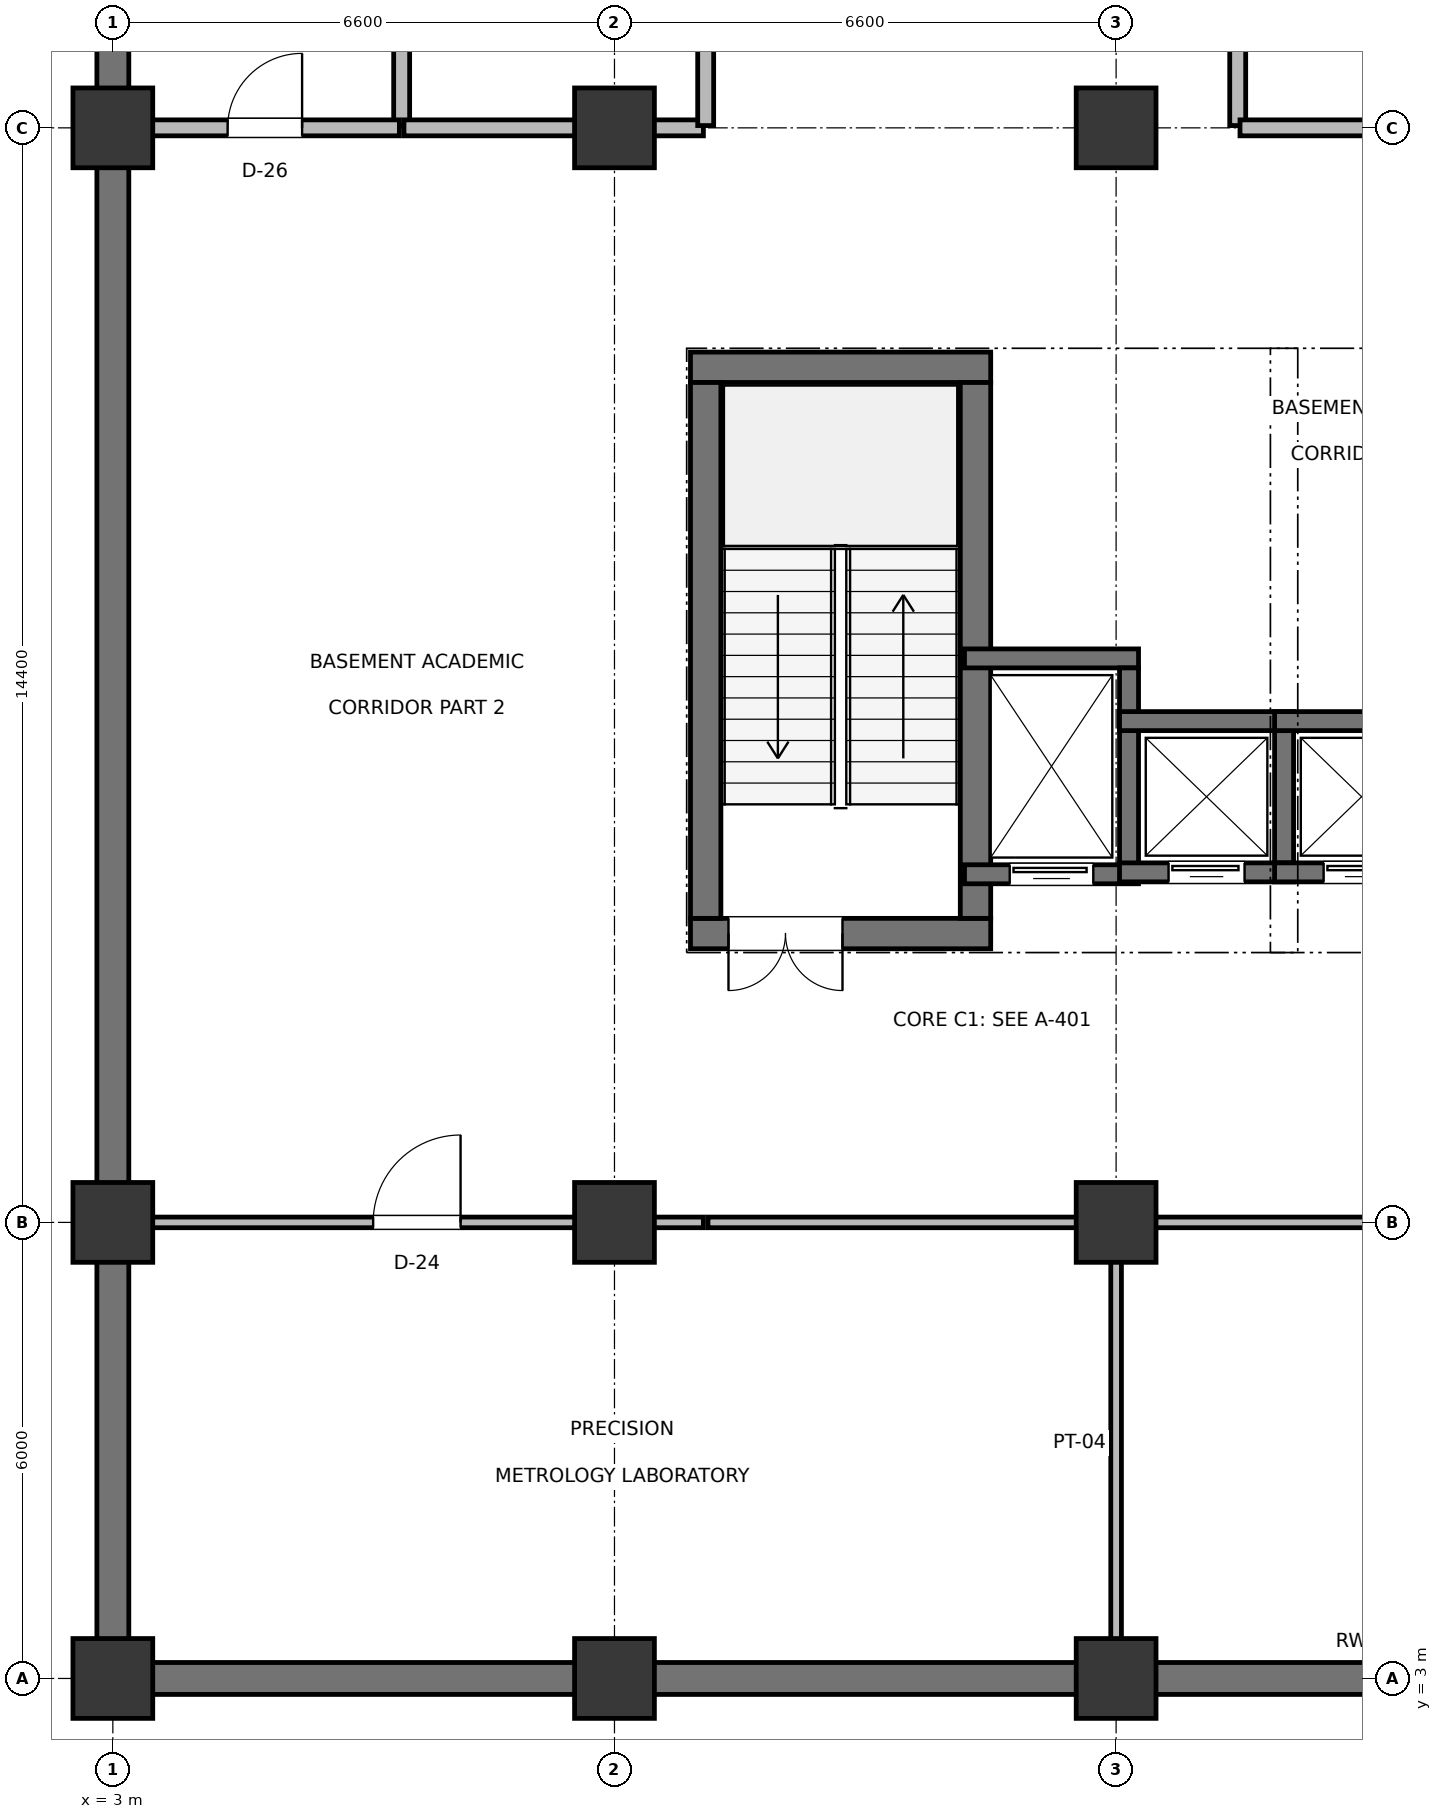
"""IFC4 building model, lengths in metres.
Left out: names, types, materials, properties, quantities, classifications, styles, units other than length and angle.
Written with IfcOpenShell. Run it as: python <this file> out.ifc"""

import sys

from ifc_helpers import new_model, si_unit, direction, frame, frame_2d, origin, origin_2d, place, context, subcontext, project, spatial, rectangle, extrude, element, fill, save


model = new_model("IFC4")
c1 = context("Model", 3, precision=1e-05, world=origin(), true_north=direction((0.0, 1.0)))
c2 = subcontext(c1, "Body", "Model", "MODEL_VIEW")
j1 = project(units=[si_unit("LENGTHUNIT", "METRE"), si_unit("PLANEANGLEUNIT", "RADIAN")], contexts=[c1])
p1 = place(None, origin())
s1 = spatial("IfcSite", under=j1, at=p1, CompositionType="ELEMENT")
p2 = place(p1, origin())
s2 = spatial("IfcBuilding", under=s1, at=p2, CompositionType="ELEMENT")
p3 = place(p2, frame((0.0, 0.0, -4.5)))
s3 = spatial("IfcBuildingStorey", under=s2, at=p3, CompositionType="ELEMENT", Elevation=-4.5)
for number, where, z_axis, x_axis in (
    (1, (3.0, 3.0, 0.0), (0.0, 0.0, 1.0), (1.0, 0.0, 0.0)),
    (2, (3.0, 9.0, 0.0), (0.0, 0.0, 1.0), (1.0, 0.0, 0.0)),
    (3, (3.0, 23.4, 0.0), (0.0, 0.0, 1.0), (1.0, 0.0, 0.0)),
    (4, (9.6, 3.0, 0.0), (0.0, 0.0, 1.0), (1.0, 0.0, 0.0)),
    (5, (9.6, 9.0, 0.0), (0.0, 0.0, 1.0), (1.0, 0.0, 0.0)),
    (6, (9.6, 23.4, 0.0), (0.0, 0.0, 1.0), (1.0, 0.0, 0.0)),
    (7, (16.2, 3.0, 0.0), (0.0, 0.0, 1.0), (1.0, 0.0, 0.0)),
    (8, (16.2, 9.0, 0.0), (0.0, 0.0, 1.0), (1.0, 0.0, 0.0)),
    (9, (16.2, 23.4, 0.0), (0.0, 0.0, 1.0), (1.0, 0.0, 0.0)),
):
    element("IfcColumn", number, at=place(p3, frame(where, z_axis=z_axis, x_axis=x_axis)), inside=s3, PredefinedType="COLUMN", context=c2, shape_type="SweptSolid", body=[
        extrude(rectangle(XDim=1.05, YDim=1.05, at=origin_2d()), origin(), (0.0, 0.0, 1.0), 4.5),
    ])
p4 = place(p3, frame((2.995, 3.0, 0.0), z_axis=(0.0, 0.0, 1.0), x_axis=(1.0, 0.0, 0.0)))
e10 = element("IfcWall", 10, at=p4, inside=s3, PredefinedType="STANDARD", context=c2, shape_type="SweptSolid", body=[
    extrude(rectangle(XDim=33.01, YDim=0.42, at=frame_2d((16.505, 0.0))), origin(), (0.0, 0.0, 1.0), 3.45),
])
p5 = place(p3, frame((3.0, 2.995, 0.0), z_axis=(0.0, 0.0, 1.0), x_axis=(0.0, 1.0, 0.0)))
e11 = element("IfcWall", 11, at=p5, inside=s3, PredefinedType="STANDARD", context=c2, shape_type="SweptSolid", body=[
    extrude(rectangle(XDim=114.01, YDim=0.42, at=frame_2d((57.005, 0.0))), origin(), (0.0, 0.0, 1.0), 3.45),
])
p6 = place(p3, frame((10.6, 12.8, 0.0), z_axis=(0.0, 0.0, 1.0), x_axis=(1.0, 0.0, 0.0)))
e12 = element("IfcWall", 12, at=p6, inside=s3, PredefinedType="SHEAR", context=c2, shape_type="SweptSolid", body=[
    extrude(rectangle(XDim=3.95, YDim=0.4, at=frame_2d((1.975, 0.0))), origin(), (0.0, 0.0, 1.0), 4.28),
])
p7 = place(p6, frame((0.5, 0.0, 0.0)))
e13 = element("IfcOpeningElement", 13, at=p7, cuts=e12, PredefinedType="OPENING", context=c2, shape_type="SweptSolid", body=[
    extrude(rectangle(XDim=1.5, YDim=2.2, at=frame_2d((0.75, 1.1))), frame((0.0, 0.21, 0.0), z_axis=(0.0, -1.0, 0.0), x_axis=(1.0, 0.0, 0.0)), (0.0, 0.0, 1.0), 0.42),
])
p8 = place(p3, frame((10.6, 20.25, 0.0), z_axis=(0.0, 0.0, 1.0), x_axis=(1.0, 0.0, 0.0)))
e14 = element("IfcWall", 14, at=p8, inside=s3, PredefinedType="SHEAR", context=c2, shape_type="SweptSolid", body=[
    extrude(rectangle(XDim=3.95, YDim=0.4, at=frame_2d((1.975, 0.0))), origin(), (0.0, 0.0, 1.0), 4.28),
])
for number, where, z_axis, x_axis in (
    (15, (10.8, 13.0, 0.0), (0.0, 0.0, 1.0), (0.0, 1.0, 0.0)),
    (16, (14.35, 13.0, 0.0), (0.0, 0.0, 1.0), (0.0, 1.0, 0.0)),
):
    element("IfcWall", number, at=place(p3, frame(where, z_axis=z_axis, x_axis=x_axis)), inside=s3, PredefinedType="SHEAR", context=c2, shape_type="SweptSolid", body=[
        extrude(rectangle(XDim=7.05, YDim=0.4, at=frame_2d((3.525, 0.0))), origin(), (0.0, 0.0, 1.0), 4.28),
    ])
p9 = place(p3, frame((14.205, 13.58, 0.0), z_axis=(0.0, 0.0, 1.0), x_axis=(1.0, 0.0, 0.0)))
e17 = element("IfcWall", 17, at=p9, inside=s3, PredefinedType="SHEAR", context=c2, shape_type="SweptSolid", body=[
    extrude(rectangle(XDim=2.29, YDim=0.25, at=frame_2d((1.145, 0.0))), origin(), (0.0, 0.0, 1.0), 4.26),
])
p10 = place(p9, frame((0.595, 0.0, 0.0)))
e18 = element("IfcOpeningElement", 18, at=p10, cuts=e17, PredefinedType="OPENING", context=c2, shape_type="SweptSolid", body=[
    extrude(rectangle(XDim=1.1, YDim=2.2, at=frame_2d((0.55, 1.1))), frame((0.0, 0.135, 0.0), z_axis=(0.0, -1.0, 0.0), x_axis=(1.0, 0.0, 0.0)), (0.0, 0.0, 1.0), 0.27),
])
p11 = place(p3, frame((14.205, 16.42, 0.0), z_axis=(0.0, 0.0, 1.0), x_axis=(1.0, 0.0, 0.0)))
e19 = element("IfcWall", 19, at=p11, inside=s3, PredefinedType="SHEAR", context=c2, shape_type="SweptSolid", body=[
    extrude(rectangle(XDim=2.29, YDim=0.25, at=frame_2d((1.145, 0.0))), origin(), (0.0, 0.0, 1.0), 4.26),
])
p12 = place(p3, frame((16.37, 13.705, 0.0), z_axis=(0.0, 0.0, 1.0), x_axis=(0.0, 1.0, 0.0)))
e20 = element("IfcWall", 20, at=p12, inside=s3, PredefinedType="SHEAR", context=c2, shape_type="SweptSolid", body=[
    extrude(rectangle(XDim=2.59, YDim=0.25, at=frame_2d((1.295, 0.0))), origin(), (0.0, 0.0, 1.0), 4.26),
])
p13 = place(p3, frame((16.245, 13.605, 0.0), z_axis=(0.0, 0.0, 1.0), x_axis=(1.0, 0.0, 0.0)))
e21 = element("IfcWall", 21, at=p13, inside=s3, PredefinedType="SHEAR", context=c2, shape_type="SweptSolid", body=[
    extrude(rectangle(XDim=2.29, YDim=0.25, at=frame_2d((1.145, 0.0))), origin(), (0.0, 0.0, 1.0), 4.26),
])
p14 = place(p13, frame((0.645, 0.0, 0.0)))
e22 = element("IfcOpeningElement", 22, at=p14, cuts=e21, PredefinedType="OPENING", context=c2, shape_type="SweptSolid", body=[
    extrude(rectangle(XDim=1.0, YDim=2.15, at=frame_2d((0.5, 1.075))), frame((0.0, 0.135, 0.0), z_axis=(0.0, -1.0, 0.0), x_axis=(1.0, 0.0, 0.0)), (0.0, 0.0, 1.0), 0.27),
])
p15 = place(p3, frame((16.245, 15.595, 0.0), z_axis=(0.0, 0.0, 1.0), x_axis=(1.0, 0.0, 0.0)))
e23 = element("IfcWall", 23, at=p15, inside=s3, PredefinedType="SHEAR", context=c2, shape_type="SweptSolid", body=[
    extrude(rectangle(XDim=2.29, YDim=0.25, at=frame_2d((1.145, 0.0))), origin(), (0.0, 0.0, 1.0), 4.26),
])
p16 = place(p3, frame((18.41, 13.73, 0.0), z_axis=(0.0, 0.0, 1.0), x_axis=(0.0, 1.0, 0.0)))
e24 = element("IfcWall", 24, at=p16, inside=s3, PredefinedType="SHEAR", context=c2, shape_type="SweptSolid", body=[
    extrude(rectangle(XDim=1.74, YDim=0.25, at=frame_2d((0.87, 0.0))), origin(), (0.0, 0.0, 1.0), 4.26),
])
p17 = place(p3, frame((18.285, 13.605, 0.0), z_axis=(0.0, 0.0, 1.0), x_axis=(1.0, 0.0, 0.0)))
e25 = element("IfcWall", 25, at=p17, inside=s3, PredefinedType="SHEAR", context=c2, shape_type="SweptSolid", body=[
    extrude(rectangle(XDim=2.29, YDim=0.25, at=frame_2d((1.145, 0.0))), origin(), (0.0, 0.0, 1.0), 4.26),
])
p18 = place(p17, frame((0.645, 0.0, 0.0)))
e26 = element("IfcOpeningElement", 26, at=p18, cuts=e25, PredefinedType="OPENING", context=c2, shape_type="SweptSolid", body=[
    extrude(rectangle(XDim=1.0, YDim=2.15, at=frame_2d((0.5, 1.075))), frame((0.0, 0.135, 0.0), z_axis=(0.0, -1.0, 0.0), x_axis=(1.0, 0.0, 0.0)), (0.0, 0.0, 1.0), 0.27),
])
p19 = place(p3, frame((18.285, 15.595, 0.0), z_axis=(0.0, 0.0, 1.0), x_axis=(1.0, 0.0, 0.0)))
e27 = element("IfcWall", 27, at=p19, inside=s3, PredefinedType="SHEAR", context=c2, shape_type="SweptSolid", body=[
    extrude(rectangle(XDim=2.29, YDim=0.25, at=frame_2d((1.145, 0.0))), origin(), (0.0, 0.0, 1.0), 4.26),
])
p20 = place(p3, frame((16.2, 3.23, 0.0), z_axis=(0.0, 0.0, 1.0), x_axis=(0.0, 1.0, 0.0)))
e28 = element("IfcWall", 28, at=p20, inside=s3, PredefinedType="PARTITIONING", context=c2, shape_type="SweptSolid", body=[
    extrude(rectangle(XDim=5.74, YDim=0.14, at=frame_2d((2.87, 0.0))), origin(), (0.0, 0.0, 1.0), 3.625),
])
p21 = place(p3, frame((3.23, 9.0, 0.0), z_axis=(0.0, 0.0, 1.0), x_axis=(1.0, 0.0, 0.0)))
e29 = element("IfcWall", 29, at=p21, inside=s3, PredefinedType="PARTITIONING", context=c2, shape_type="SweptSolid", body=[
    extrude(rectangle(XDim=7.54, YDim=0.14, at=frame_2d((3.77, 0.0))), origin(), (0.0, 0.0, 1.0), 3.525),
])
p22 = place(p21, frame((3.195, 0.0, 0.0)))
e30 = element("IfcOpeningElement", 30, at=p22, cuts=e29, PredefinedType="OPENING", context=c2, shape_type="SweptSolid", body=[
    extrude(rectangle(XDim=1.15, YDim=2.15, at=frame_2d((0.575, 1.075))), frame((0.0, 0.08, 0.0), z_axis=(0.0, -1.0, 0.0), x_axis=(1.0, 0.0, 0.0)), (0.0, 0.0, 1.0), 0.16),
])
p23 = place(p3, frame((10.83, 9.0, 0.0), z_axis=(0.0, 0.0, 1.0), x_axis=(1.0, 0.0, 0.0)))
e31 = element("IfcWall", 31, at=p23, inside=s3, PredefinedType="PARTITIONING", context=c2, shape_type="SweptSolid", body=[
    extrude(rectangle(XDim=5.34, YDim=0.14, at=frame_2d((2.67, 0.0))), origin(), (0.0, 0.0, 1.0), 3.525),
])
p24 = place(p3, frame((16.23, 9.0, 0.0), z_axis=(0.0, 0.0, 1.0), x_axis=(1.0, 0.0, 0.0)))
e32 = element("IfcWall", 32, at=p24, inside=s3, PredefinedType="PARTITIONING", context=c2, shape_type="SweptSolid", body=[
    extrude(rectangle(XDim=7.74, YDim=0.14, at=frame_2d((3.87, 0.0))), origin(), (0.0, 0.0, 1.0), 3.495),
])
p25 = place(p24, frame((3.295, 0.0, 0.0)))
e33 = element("IfcOpeningElement", 33, at=p25, cuts=e32, PredefinedType="OPENING", context=c2, shape_type="SweptSolid", body=[
    extrude(rectangle(XDim=1.15, YDim=2.15, at=frame_2d((0.575, 1.075))), frame((0.0, 0.08, 0.0), z_axis=(0.0, -1.0, 0.0), x_axis=(1.0, 0.0, 0.0)), (0.0, 0.0, 1.0), 0.16),
])
p26 = place(p3, frame((6.8, 23.43, 0.0), z_axis=(0.0, 0.0, 1.0), x_axis=(0.0, 1.0, 0.0)))
e34 = element("IfcWall", 34, at=p26, inside=s3, PredefinedType="PLUMBINGWALL", context=c2, shape_type="SweptSolid", body=[
    extrude(rectangle(XDim=6.54, YDim=0.21, at=frame_2d((3.27, 0.0))), origin(), (0.0, 0.0, 1.0), 3.425),
])
p27 = place(p3, frame((3.23, 23.4, 0.0), z_axis=(0.0, 0.0, 1.0), x_axis=(1.0, 0.0, 0.0)))
e35 = element("IfcWall", 35, at=p27, inside=s3, PredefinedType="PLUMBINGWALL", context=c2, shape_type="SweptSolid", body=[
    extrude(rectangle(XDim=3.54, YDim=0.21, at=frame_2d((1.77, 0.0))), origin(), (0.0, 0.0, 1.0), 3.755),
])
p28 = place(p27, frame((1.28, 0.0, 0.0)))
e36 = element("IfcOpeningElement", 36, at=p28, cuts=e35, PredefinedType="OPENING", context=c2, shape_type="SweptSolid", body=[
    extrude(rectangle(XDim=0.98, YDim=2.1, at=frame_2d((0.49, 1.05))), frame((0.0, 0.115, 0.0), z_axis=(0.0, -1.0, 0.0), x_axis=(1.0, 0.0, 0.0)), (0.0, 0.0, 1.0), 0.23),
])
p29 = place(p3, frame((6.83, 23.4, 0.0), z_axis=(0.0, 0.0, 1.0), x_axis=(1.0, 0.0, 0.0)))
e37 = element("IfcWall", 37, at=p29, inside=s3, PredefinedType="PLUMBINGWALL", context=c2, shape_type="SweptSolid", body=[
    extrude(rectangle(XDim=3.94, YDim=0.21, at=frame_2d((1.97, 0.0))), origin(), (0.0, 0.0, 1.0), 3.525),
])
p30 = place(p3, frame((10.8, 23.43, 0.0), z_axis=(0.0, 0.0, 1.0), x_axis=(0.0, 1.0, 0.0)))
e38 = element("IfcWall", 38, at=p30, inside=s3, PredefinedType="PLUMBINGWALL", context=c2, shape_type="SweptSolid", body=[
    extrude(rectangle(XDim=6.54, YDim=0.21, at=frame_2d((3.27, 0.0))), origin(), (0.0, 0.0, 1.0), 3.435),
])
p31 = place(p30, frame((2.81, 0.0, 0.0)))
e39 = element("IfcOpeningElement", 39, at=p31, cuts=e38, PredefinedType="OPENING", context=c2, shape_type="SweptSolid", body=[
    extrude(rectangle(XDim=0.92, YDim=2.1, at=frame_2d((0.46, 1.05))), frame((0.0, 0.115, 0.0), z_axis=(0.0, -1.0, 0.0), x_axis=(1.0, 0.0, 0.0)), (0.0, 0.0, 1.0), 0.23),
])
p32 = place(p3, frame((17.8, 23.43, 0.0), z_axis=(0.0, 0.0, 1.0), x_axis=(0.0, 1.0, 0.0)))
e40 = element("IfcWall", 40, at=p32, inside=s3, PredefinedType="PLUMBINGWALL", context=c2, shape_type="SweptSolid", body=[
    extrude(rectangle(XDim=6.54, YDim=0.21, at=frame_2d((3.27, 0.0))), origin(), (0.0, 0.0, 1.0), 3.425),
])
p33 = place(p32, frame((2.81, 0.0, 0.0)))
e41 = element("IfcOpeningElement", 41, at=p33, cuts=e40, PredefinedType="OPENING", context=c2, shape_type="SweptSolid", body=[
    extrude(rectangle(XDim=0.92, YDim=2.1, at=frame_2d((0.46, 1.05))), frame((0.0, 0.115, 0.0), z_axis=(0.0, -1.0, 0.0), x_axis=(1.0, 0.0, 0.0)), (0.0, 0.0, 1.0), 0.23),
])
p34 = place(p3, frame((17.83, 23.4, 0.0), z_axis=(0.0, 0.0, 1.0), x_axis=(1.0, 0.0, 0.0)))
e42 = element("IfcWall", 42, at=p34, inside=s3, PredefinedType="PLUMBINGWALL", context=c2, shape_type="SweptSolid", body=[
    extrude(rectangle(XDim=6.14, YDim=0.21, at=frame_2d((3.07, 0.0))), origin(), (0.0, 0.0, 1.0), 3.525),
])
p35 = place(p7, frame((1.5, 0.0, 0.0), z_axis=(0.0, 0.0, 1.0), x_axis=(-1.0, 0.0, 0.0)))
e43 = element("IfcDoor", 43, at=p35, inside=s3, OperationType="DOUBLE_DOOR_SINGLE_SWING", PredefinedType="DOOR", context=c2, shape_type="SweptSolid", body=[
    extrude(rectangle(XDim=1.5, YDim=2.2, at=frame_2d((0.75, 1.1))), frame((0.0, 0.025, 0.0), z_axis=(0.0, -1.0, 0.0), x_axis=(1.0, 0.0, 0.0)), (0.0, 0.0, 1.0), 0.05),
])
fill(e13, e43)
p36 = place(p10, frame((1.1, 0.0, 0.0), z_axis=(0.0, 0.0, 1.0), x_axis=(-1.0, 0.0, 0.0)))
e44 = element("IfcDoor", 44, at=p36, inside=s3, OperationType="SLIDING_TO_LEFT", PredefinedType="DOOR", context=c2, shape_type="SweptSolid", body=[
    extrude(rectangle(XDim=1.1, YDim=2.2, at=frame_2d((0.55, 1.1))), frame((0.0, 0.025, 0.0), z_axis=(0.0, -1.0, 0.0), x_axis=(1.0, 0.0, 0.0)), (0.0, 0.0, 1.0), 0.05),
])
fill(e18, e44)
p37 = place(p14, frame((1.0, 0.0, 0.0), z_axis=(0.0, 0.0, 1.0), x_axis=(-1.0, 0.0, 0.0)))
e45 = element("IfcDoor", 45, at=p37, inside=s3, OperationType="SLIDING_TO_LEFT", PredefinedType="DOOR", context=c2, shape_type="SweptSolid", body=[
    extrude(rectangle(XDim=1.0, YDim=2.15, at=frame_2d((0.5, 1.075))), frame((0.0, 0.025, 0.0), z_axis=(0.0, -1.0, 0.0), x_axis=(1.0, 0.0, 0.0)), (0.0, 0.0, 1.0), 0.05),
])
fill(e22, e45)
p38 = place(p18, frame((1.0, 0.0, 0.0), z_axis=(0.0, 0.0, 1.0), x_axis=(-1.0, 0.0, 0.0)))
e46 = element("IfcDoor", 46, at=p38, inside=s3, OperationType="SLIDING_TO_LEFT", PredefinedType="DOOR", context=c2, shape_type="SweptSolid", body=[
    extrude(rectangle(XDim=1.0, YDim=2.15, at=frame_2d((0.5, 1.075))), frame((0.0, 0.025, 0.0), z_axis=(0.0, -1.0, 0.0), x_axis=(1.0, 0.0, 0.0)), (0.0, 0.0, 1.0), 0.05),
])
fill(e26, e46)
p39 = place(p22, origin())
e47 = element("IfcDoor", 47, at=p39, inside=s3, OperationType="SINGLE_SWING_RIGHT", PredefinedType="DOOR", context=c2, shape_type="SweptSolid", body=[
    extrude(rectangle(XDim=1.15, YDim=2.15, at=frame_2d((0.575, 1.075))), frame((0.0, 0.025, 0.0), z_axis=(0.0, -1.0, 0.0), x_axis=(1.0, 0.0, 0.0)), (0.0, 0.0, 1.0), 0.05),
])
fill(e30, e47)
p40 = place(p28, origin())
e48 = element("IfcDoor", 48, at=p40, inside=s3, OperationType="SINGLE_SWING_RIGHT", PredefinedType="DOOR", context=c2, shape_type="SweptSolid", body=[
    extrude(rectangle(XDim=0.98, YDim=2.1, at=frame_2d((0.49, 1.05))), frame((0.0, 0.025, 0.0), z_axis=(0.0, -1.0, 0.0), x_axis=(1.0, 0.0, 0.0)), (0.0, 0.0, 1.0), 0.05),
])
fill(e36, e48)
save(model, sys.argv[1])
